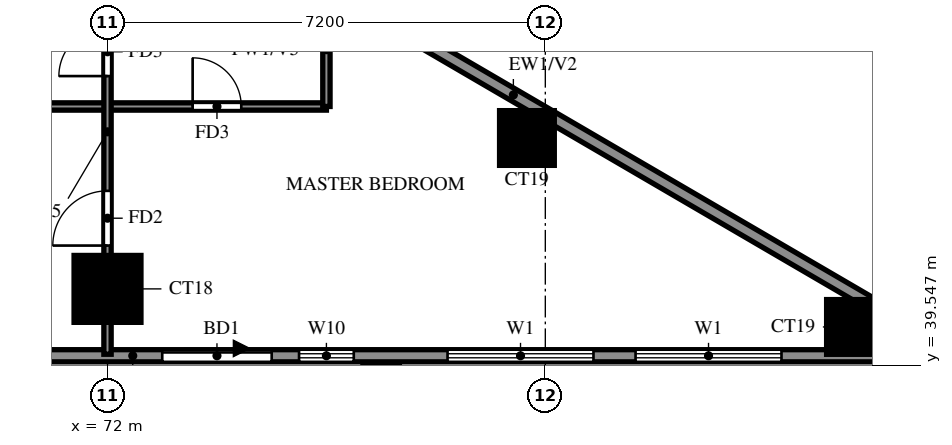
"""IFC4 building model, lengths in metres.
Left out: names, types, materials, properties, quantities, classifications, styles, units other than length and angle.
Written with IfcOpenShell. Run it as: python <this file> out.ifc"""

import sys

from ifc_helpers import new_model, si_unit, direction, frame, frame_2d, origin, origin_2d, place, context, subcontext, project, spatial, rectangle, extrude, source, transform, mapped, element, fill, save


model = new_model("IFC4")
c1 = context("Model", 3, precision=1e-05, world=origin(), true_north=direction((0.0, 1.0)))
c2 = subcontext(c1, "Body", "Model", "MODEL_VIEW")
j1 = project(units=[si_unit("LENGTHUNIT", "METRE"), si_unit("PLANEANGLEUNIT", "RADIAN")], contexts=[c1])
p1 = place(None, origin())
s1 = spatial("IfcSite", under=j1, at=p1, CompositionType="ELEMENT")
p2 = place(p1, origin())
s2 = spatial("IfcBuilding", under=s1, at=p2, CompositionType="ELEMENT")
p3 = place(p2, frame((0.0, 0.0, 123.5)))
s3 = spatial("IfcBuildingStorey", under=s2, at=p3, CompositionType="ELEMENT", Elevation=123.5)
m1 = source(origin(), c2, "Body", "SweptSolid", [
    extrude(rectangle(XDim=0.9, YDim=0.9, at=origin_2d()), origin(), (0.0, 0.0, 1.0), 3.2),
])
p4 = place(p3, frame((84.276, 40.174, 0.0), z_axis=(0.0, 0.0, 1.0), x_axis=(1.0, 0.0, 0.0)))
e1 = element("IfcColumn", 1, at=p4, inside=s3, PredefinedType="COLUMN", context=c2, shape_type="MappedRepresentation", body=[
    mapped(m1, transform((0.0, 0.0, 0.0))),
])
m2 = source(origin(), c2, "Body", "SweptSolid", [
    extrude(rectangle(XDim=1.1, YDim=1.1, at=origin_2d()), origin(), (0.0, 0.0, 1.0), 3.2),
])
p5 = place(p3, frame((72.0, 40.8, 0.0), z_axis=(0.0, 0.0, 1.0), x_axis=(1.0, 0.0, 0.0)))
e2 = element("IfcColumn", 2, at=p5, inside=s3, PredefinedType="COLUMN", context=c2, shape_type="MappedRepresentation", body=[
    mapped(m2, transform((0.0, 0.0, 0.0))),
])
p6 = place(p3, frame((78.898, 43.282, 0.0), z_axis=(0.0, 0.0, 1.0), x_axis=(1.0, 0.0, 0.0)))
e3 = element("IfcColumn", 3, at=p6, inside=s3, PredefinedType="COLUMN", context=c2, shape_type="MappedRepresentation", body=[
    mapped(m1, transform((0.0, 0.0, 0.0))),
])
p7 = place(p3, frame((85.719, 39.881, 0.0), z_axis=(0.0, 0.0, 1.0), x_axis=(-0.86377618652, 0.503875678716, 0.0)))
e4 = element("IfcWall", 4, at=p7, inside=s3, PredefinedType="SOLIDWALL", context=c2, shape_type="SweptSolid", body=[
    extrude(rectangle(XDim=16.311, YDim=0.2, at=frame_2d((8.156, 0.0))), origin(), (0.0, 0.0, 1.0), 3.2),
])
p8 = place(p7, frame((13.326, 0.0, 1.5)))
e5 = element("IfcOpeningElement", 5, at=p8, cuts=e4, PredefinedType="OPENING", context=c2, shape_type="SweptSolid", body=[
    extrude(rectangle(XDim=0.9, YDim=0.9, at=frame_2d((0.45, 0.45))), frame((0.0, 0.11, 0.0), z_axis=(0.0, -1.0, 0.0), x_axis=(1.0, 0.0, 0.0)), (0.0, 0.0, 1.0), 0.22),
])
p9 = place(p3, frame((58.8, 39.7, 0.0), z_axis=(0.0, 0.0, 1.0), x_axis=(1.0, 0.0, 0.0)))
e6 = element("IfcWall", 6, at=p9, inside=s3, PredefinedType="SOLIDWALL", context=c2, shape_type="SweptSolid", body=[
    extrude(rectangle(XDim=27.23, YDim=0.2, at=frame_2d((13.615, 0.0))), origin(), (0.0, 0.0, 1.0), 3.2),
])
p10 = place(p9, frame((14.1, 0.0, 0.0)))
e7 = element("IfcOpeningElement", 7, at=p10, cuts=e6, PredefinedType="OPENING", context=c2, shape_type="SweptSolid", body=[
    extrude(rectangle(XDim=1.8, YDim=2.4, at=frame_2d((0.9, 1.2))), frame((0.0, 0.11, 0.0), z_axis=(0.0, -1.0, 0.0), x_axis=(1.0, 0.0, 0.0)), (0.0, 0.0, 1.0), 0.22),
])
p11 = place(p9, frame((2.433, 0.0, 0.6)))
e8 = element("IfcOpeningElement", 8, at=p11, cuts=e6, PredefinedType="OPENING", context=c2, shape_type="SweptSolid", body=[
    extrude(rectangle(XDim=2.4, YDim=2.4, at=frame_2d((1.2, 1.2))), frame((0.0, 0.11, 0.0), z_axis=(0.0, -1.0, 0.0), x_axis=(1.0, 0.0, 0.0)), (0.0, 0.0, 1.0), 0.22),
])
p12 = place(p9, frame((5.967, 0.0, 0.6)))
e9 = element("IfcOpeningElement", 9, at=p12, cuts=e6, PredefinedType="OPENING", context=c2, shape_type="SweptSolid", body=[
    extrude(rectangle(XDim=2.4, YDim=2.4, at=frame_2d((1.2, 1.2))), frame((0.0, 0.11, 0.0), z_axis=(0.0, -1.0, 0.0), x_axis=(1.0, 0.0, 0.0)), (0.0, 0.0, 1.0), 0.22),
])
p13 = place(p9, frame((16.35, 0.0, 0.6)))
e10 = element("IfcOpeningElement", 10, at=p13, cuts=e6, PredefinedType="OPENING", context=c2, shape_type="SweptSolid", body=[
    extrude(rectangle(XDim=0.9, YDim=2.4, at=frame_2d((0.45, 1.2))), frame((0.0, 0.11, 0.0), z_axis=(0.0, -1.0, 0.0), x_axis=(1.0, 0.0, 0.0)), (0.0, 0.0, 1.0), 0.22),
])
p14 = place(p9, frame((18.792, 0.0, 0.6)))
e11 = element("IfcOpeningElement", 11, at=p14, cuts=e6, PredefinedType="OPENING", context=c2, shape_type="SweptSolid", body=[
    extrude(rectangle(XDim=2.4, YDim=2.4, at=frame_2d((1.2, 1.2))), frame((0.0, 0.11, 0.0), z_axis=(0.0, -1.0, 0.0), x_axis=(1.0, 0.0, 0.0)), (0.0, 0.0, 1.0), 0.22),
])
p15 = place(p9, frame((21.884, 0.0, 0.6)))
e12 = element("IfcOpeningElement", 12, at=p15, cuts=e6, PredefinedType="OPENING", context=c2, shape_type="SweptSolid", body=[
    extrude(rectangle(XDim=2.4, YDim=2.4, at=frame_2d((1.2, 1.2))), frame((0.0, 0.11, 0.0), z_axis=(0.0, -1.0, 0.0), x_axis=(1.0, 0.0, 0.0)), (0.0, 0.0, 1.0), 0.22),
])
p16 = place(p9, frame((26.003, 0.0, 0.6)))
e13 = element("IfcOpeningElement", 13, at=p16, cuts=e6, PredefinedType="OPENING", context=c2, shape_type="SweptSolid", body=[
    extrude(rectangle(XDim=0.9, YDim=2.4, at=frame_2d((0.45, 1.2))), frame((0.0, 0.11, 0.0), z_axis=(0.0, -1.0, 0.0), x_axis=(1.0, 0.0, 0.0)), (0.0, 0.0, 1.0), 0.22),
])
p17 = place(p3, frame((60.0, 43.8, 0.0), z_axis=(0.0, 0.0, 1.0), x_axis=(1.0, 0.0, 0.0)))
e14 = element("IfcWall", 14, at=p17, inside=s3, PredefinedType="PARTITIONING", context=c2, shape_type="SweptSolid", body=[
    extrude(rectangle(XDim=15.6, YDim=0.12, at=frame_2d((7.8, 0.0))), origin(), (0.0, 0.0, 1.0), 3.2),
])
p18 = place(p17, frame((9.75, 0.0, 0.0)))
e15 = element("IfcOpeningElement", 15, at=p18, cuts=e14, PredefinedType="OPENING", context=c2, shape_type="SweptSolid", body=[
    extrude(rectangle(XDim=0.9, YDim=2.1, at=frame_2d((0.45, 1.05))), frame((0.0, 0.07, 0.0), z_axis=(0.0, -1.0, 0.0), x_axis=(1.0, 0.0, 0.0)), (0.0, 0.0, 1.0), 0.14),
])
p19 = place(p17, frame((3.45, 0.0, 0.0)))
e16 = element("IfcOpeningElement", 16, at=p19, cuts=e14, PredefinedType="OPENING", context=c2, shape_type="SweptSolid", body=[
    extrude(rectangle(XDim=1.5, YDim=2.1, at=frame_2d((0.75, 1.05))), frame((0.0, 0.07, 0.0), z_axis=(0.0, -1.0, 0.0), x_axis=(1.0, 0.0, 0.0)), (0.0, 0.0, 1.0), 0.14),
])
p20 = place(p17, frame((13.4, 0.0, 0.0)))
e17 = element("IfcOpeningElement", 17, at=p20, cuts=e14, PredefinedType="OPENING", context=c2, shape_type="SweptSolid", body=[
    extrude(rectangle(XDim=0.8, YDim=2.1, at=frame_2d((0.4, 1.05))), frame((0.0, 0.07, 0.0), z_axis=(0.0, -1.0, 0.0), x_axis=(1.0, 0.0, 0.0)), (0.0, 0.0, 1.0), 0.14),
])
p21 = place(p3, frame((72.0, 39.725, 0.0), z_axis=(0.0, 0.0, 1.0), x_axis=(0.0, 1.0, 0.0)))
e18 = element("IfcWall", 18, at=p21, inside=s3, PredefinedType="PARTITIONING", context=c2, shape_type="SweptSolid", body=[
    extrude(rectangle(XDim=8.13, YDim=0.12, at=frame_2d((4.065, 0.0))), origin(), (0.0, 0.0, 1.0), 2.3),
])
p22 = place(p21, frame((1.788, 0.0, 0.0)))
e19 = element("IfcOpeningElement", 19, at=p22, cuts=e18, PredefinedType="OPENING", context=c2, shape_type="SweptSolid", body=[
    extrude(rectangle(XDim=0.9, YDim=2.1, at=frame_2d((0.45, 1.05))), frame((0.0, 0.07, 0.0), z_axis=(0.0, -1.0, 0.0), x_axis=(1.0, 0.0, 0.0)), (0.0, 0.0, 1.0), 0.14),
])
p23 = place(p21, frame((4.575, 0.0, 0.0)))
e20 = element("IfcOpeningElement", 20, at=p23, cuts=e18, PredefinedType="OPENING", context=c2, shape_type="SweptSolid", body=[
    extrude(rectangle(XDim=0.8, YDim=2.1, at=frame_2d((0.4, 1.05))), frame((0.0, 0.07, 0.0), z_axis=(0.0, -1.0, 0.0), x_axis=(1.0, 0.0, 0.0)), (0.0, 0.0, 1.0), 0.14),
])
p24 = place(p3, frame((75.6, 43.8, 0.0), z_axis=(0.0, 0.0, 1.0), x_axis=(0.0, 1.0, 0.0)))
e21 = element("IfcWall", 21, at=p24, inside=s3, PredefinedType="PARTITIONING", context=c2, shape_type="SweptSolid", body=[
    extrude(rectangle(XDim=1.868, YDim=0.12, at=frame_2d((0.934, 0.0))), origin(), (0.0, 0.0, 1.0), 2.3),
])
p25 = place(p10, origin())
e22 = element("IfcDoor", 22, at=p25, inside=s3, OperationType="DOUBLE_DOOR_SLIDING", PredefinedType="DOOR", context=c2, shape_type="SweptSolid", body=[
    extrude(rectangle(XDim=1.8, YDim=2.4, at=frame_2d((0.9, 1.2))), frame((0.0, 0.025, 0.0), z_axis=(0.0, -1.0, 0.0), x_axis=(1.0, 0.0, 0.0)), (0.0, 0.0, 1.0), 0.05),
])
fill(e7, e22)
p26 = place(p13, origin())
e23 = element("IfcWindow", 23, at=p26, inside=s3, PartitioningType="SINGLE_PANEL", PredefinedType="WINDOW", context=c2, shape_type="SweptSolid", body=[
    extrude(rectangle(XDim=0.9, YDim=2.4, at=frame_2d((0.45, 1.2))), frame((0.0, 0.03, 0.0), z_axis=(0.0, -1.0, 0.0), x_axis=(1.0, 0.0, 0.0)), (0.0, 0.0, 1.0), 0.06),
])
fill(e10, e23)
p27 = place(p14, origin())
e24 = element("IfcWindow", 24, at=p27, inside=s3, PartitioningType="DOUBLE_PANEL_VERTICAL", PredefinedType="WINDOW", context=c2, shape_type="SweptSolid", body=[
    extrude(rectangle(XDim=2.4, YDim=2.4, at=frame_2d((1.2, 1.2))), frame((0.0, 0.03, 0.0), z_axis=(0.0, -1.0, 0.0), x_axis=(1.0, 0.0, 0.0)), (0.0, 0.0, 1.0), 0.06),
])
fill(e11, e24)
p28 = place(p15, origin())
e25 = element("IfcWindow", 25, at=p28, inside=s3, PartitioningType="DOUBLE_PANEL_VERTICAL", PredefinedType="WINDOW", context=c2, shape_type="SweptSolid", body=[
    extrude(rectangle(XDim=2.4, YDim=2.4, at=frame_2d((1.2, 1.2))), frame((0.0, 0.03, 0.0), z_axis=(0.0, -1.0, 0.0), x_axis=(1.0, 0.0, 0.0)), (0.0, 0.0, 1.0), 0.06),
])
fill(e12, e25)
p29 = place(p22, origin())
e26 = element("IfcDoor", 26, at=p29, inside=s3, OperationType="SINGLE_SWING_RIGHT", PredefinedType="DOOR", context=c2, shape_type="SweptSolid", body=[
    extrude(rectangle(XDim=0.9, YDim=2.1, at=frame_2d((0.45, 1.05))), frame((0.0, 0.025, 0.0), z_axis=(0.0, -1.0, 0.0), x_axis=(1.0, 0.0, 0.0)), (0.0, 0.0, 1.0), 0.05),
])
fill(e19, e26)
p30 = place(p23, origin())
e27 = element("IfcDoor", 27, at=p30, inside=s3, OperationType="SINGLE_SWING_RIGHT", PredefinedType="DOOR", context=c2, shape_type="SweptSolid", body=[
    extrude(rectangle(XDim=0.8, YDim=2.1, at=frame_2d((0.4, 1.05))), frame((0.0, 0.025, 0.0), z_axis=(0.0, -1.0, 0.0), x_axis=(1.0, 0.0, 0.0)), (0.0, 0.0, 1.0), 0.05),
])
fill(e20, e27)
p31 = place(p20, origin())
e28 = element("IfcDoor", 28, at=p31, inside=s3, OperationType="SINGLE_SWING_LEFT", PredefinedType="DOOR", context=c2, shape_type="SweptSolid", body=[
    extrude(rectangle(XDim=0.8, YDim=2.1, at=frame_2d((0.4, 1.05))), frame((0.0, 0.025, 0.0), z_axis=(0.0, -1.0, 0.0), x_axis=(1.0, 0.0, 0.0)), (0.0, 0.0, 1.0), 0.05),
])
fill(e17, e28)
save(model, sys.argv[1])
